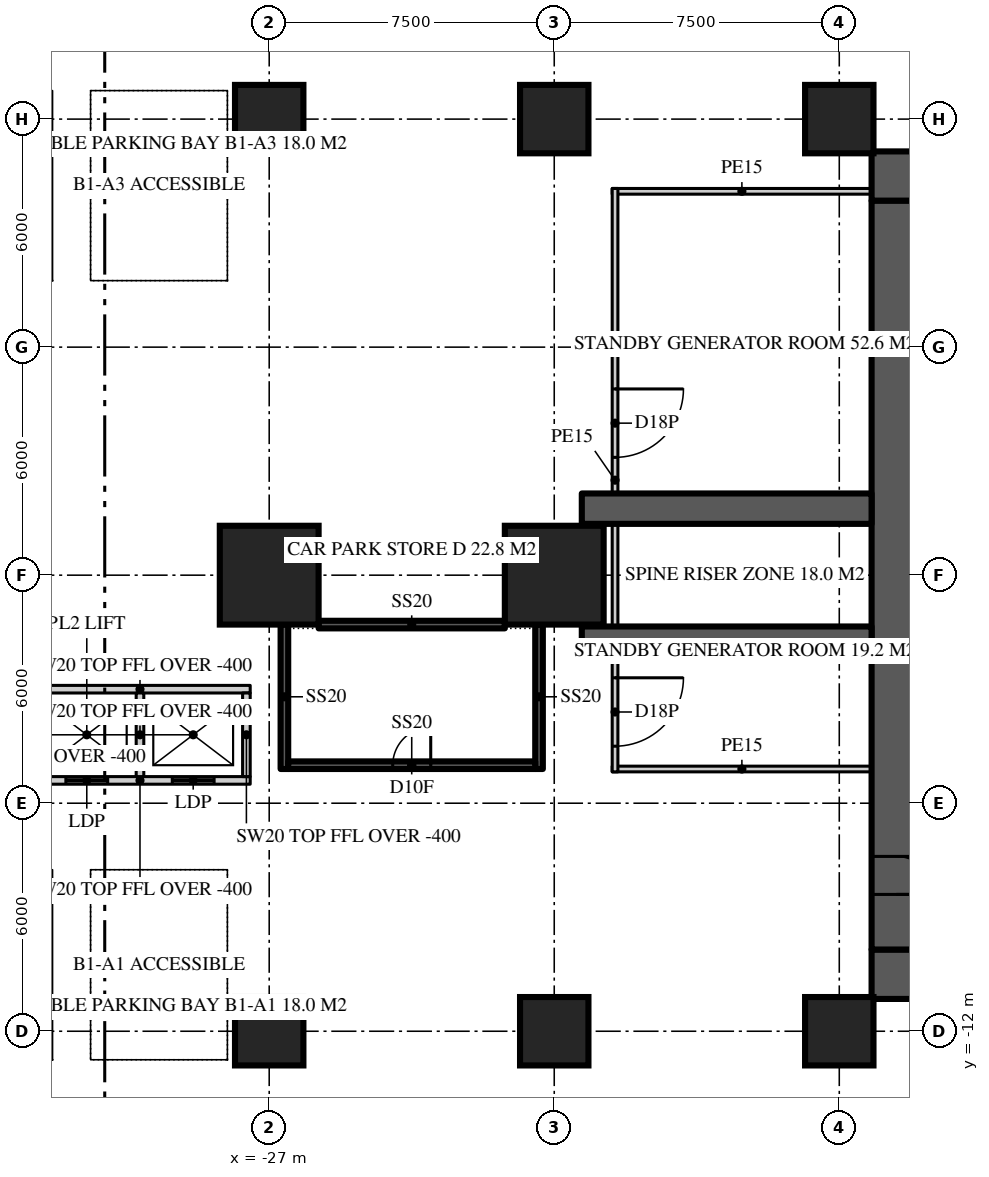
"""IFC4 building model, lengths in metres.
Left out: names, types, materials, properties, quantities, classifications, styles, units other than length and angle.
Written with IfcOpenShell. Run it as: python <this file> out.ifc"""

import sys

from ifc_helpers import new_model, si_unit, direction, frame, frame_2d, origin, origin_2d, place, context, subcontext, project, spatial, rectangle, extrude, element, fill, save


model = new_model("IFC4")
c1 = context("Model", 3, precision=1e-05, world=origin(), true_north=direction((0.0, 1.0)))
c2 = subcontext(c1, "Body", "Model", "MODEL_VIEW")
j1 = project(units=[si_unit("LENGTHUNIT", "METRE"), si_unit("PLANEANGLEUNIT", "RADIAN")], contexts=[c1])
p1 = place(None, origin())
s1 = spatial("IfcSite", under=j1, at=p1, CompositionType="ELEMENT")
p2 = place(p1, origin())
s2 = spatial("IfcBuilding", under=s1, at=p2, CompositionType="ELEMENT")
p3 = place(p2, frame((0.0, 0.0, -5.0)))
s3 = spatial("IfcBuildingStorey", under=s2, at=p3, CompositionType="ELEMENT", Elevation=-5.0)
p4 = place(p3, frame((-11.15, 10.5, 0.0), z_axis=(0.0, 0.0, 1.0), x_axis=(1.0, 0.0, 0.0)))
e1 = element("IfcWall", 1, at=p4, inside=s3, PredefinedType="SHEAR", context=c2, shape_type="SweptSolid", body=[
    extrude(rectangle(XDim=22.3, YDim=1.3, at=frame_2d((11.15, 0.0))), origin(), (0.0, 0.0, 1.0), 5.0),
])
p5 = place(p4, frame((4.25, 0.0, 0.0)))
e2 = element("IfcOpeningElement", 2, at=p5, cuts=e1, PredefinedType="OPENING", context=c2, shape_type="SweptSolid", body=[
    extrude(rectangle(XDim=1.8, YDim=2.2, at=frame_2d((0.9, 1.1))), frame((0.0, 0.66, 0.0), z_axis=(0.0, -1.0, 0.0), x_axis=(1.0, 0.0, 0.0)), (0.0, 0.0, 1.0), 1.32),
])
p6 = place(p4, frame((16.25, 0.0, 0.0)))
e3 = element("IfcOpeningElement", 3, at=p6, cuts=e1, PredefinedType="OPENING", context=c2, shape_type="SweptSolid", body=[
    extrude(rectangle(XDim=1.8, YDim=2.2, at=frame_2d((0.9, 1.1))), frame((0.0, 0.66, 0.0), z_axis=(0.0, -1.0, 0.0), x_axis=(1.0, 0.0, 0.0)), (0.0, 0.0, 1.0), 1.32),
])
p7 = place(p3, frame((11.15, -10.5, 0.0), z_axis=(0.0, 0.0, 1.0), x_axis=(-1.0, 0.0, 0.0)))
e4 = element("IfcWall", 4, at=p7, inside=s3, PredefinedType="SHEAR", context=c2, shape_type="SweptSolid", body=[
    extrude(rectangle(XDim=22.3, YDim=1.3, at=frame_2d((11.15, 0.0))), origin(), (0.0, 0.0, 1.0), 5.0),
])
p8 = place(p7, frame((16.25, 0.0, 0.0)))
e5 = element("IfcOpeningElement", 5, at=p8, cuts=e4, PredefinedType="OPENING", context=c2, shape_type="SweptSolid", body=[
    extrude(rectangle(XDim=1.8, YDim=2.2, at=frame_2d((0.9, 1.1))), frame((0.0, 0.66, 0.0), z_axis=(0.0, -1.0, 0.0), x_axis=(1.0, 0.0, 0.0)), (0.0, 0.0, 1.0), 1.32),
])
p9 = place(p7, frame((4.25, 0.0, 0.0)))
e6 = element("IfcOpeningElement", 6, at=p9, cuts=e4, PredefinedType="OPENING", context=c2, shape_type="SweptSolid", body=[
    extrude(rectangle(XDim=1.8, YDim=2.2, at=frame_2d((0.9, 1.1))), frame((0.0, 0.66, 0.0), z_axis=(0.0, -1.0, 0.0), x_axis=(1.0, 0.0, 0.0)), (0.0, 0.0, 1.0), 1.32),
])
p10 = place(p3, frame((-10.5, 9.85, 0.0), z_axis=(0.0, 0.0, 1.0), x_axis=(0.0, -1.0, 0.0)))
e7 = element("IfcWall", 7, at=p10, inside=s3, PredefinedType="SHEAR", context=c2, shape_type="SweptSolid", body=[
    extrude(rectangle(XDim=19.7, YDim=1.3, at=frame_2d((9.85, 0.0))), origin(), (0.0, 0.0, 1.0), 5.0),
])
p11 = place(p10, frame((17.25, 0.0, 0.0)))
e8 = element("IfcOpeningElement", 8, at=p11, cuts=e7, PredefinedType="OPENING", context=c2, shape_type="SweptSolid", body=[
    extrude(rectangle(XDim=1.0, YDim=2.2, at=frame_2d((0.5, 1.1))), frame((0.0, 0.66, 0.0), z_axis=(0.0, -1.0, 0.0), x_axis=(1.0, 0.0, 0.0)), (0.0, 0.0, 1.0), 1.32),
])
for number, where, z_axis, x_axis in (
    (9, (-11.15, 1.75, 0.0), (0.0, 0.0, 1.0), (-1.0, 0.0, 0.0)),
    (10, (-11.15, -1.75, 0.0), (0.0, 0.0, 1.0), (-1.0, 0.0, 0.0)),
):
    element("IfcWall", number, at=place(p3, frame(where, z_axis=z_axis, x_axis=x_axis)), inside=s3, PredefinedType="SHEAR", context=c2, shape_type="SweptSolid", body=[
        extrude(rectangle(XDim=7.625, YDim=0.8, at=frame_2d((3.812, 0.0))), origin(), (0.0, 0.0, 1.0), 5.0),
    ])
for number, where, z_axis, x_axis in (
    (11, (-27.0, -12.0, 0.0), (0.0, 0.0, 1.0), (1.0, 0.0, 0.0)),
    (12, (-19.5, -12.0, 0.0), (0.0, 0.0, 1.0), (1.0, 0.0, 0.0)),
    (13, (-12.0, -12.0, 0.0), (0.0, 0.0, 1.0), (1.0, 0.0, 0.0)),
):
    element("IfcColumn", number, at=place(p3, frame(where, z_axis=z_axis, x_axis=x_axis)), inside=s3, PredefinedType="COLUMN", context=c2, shape_type="SweptSolid", body=[
        extrude(rectangle(XDim=1.8, YDim=1.8, at=origin_2d()), origin(), (0.0, 0.0, 1.0), 5.0),
    ])
for number, where, z_axis, x_axis in (
    (14, (-27.0, 0.0, 0.0), (0.0, 0.0, 1.0), (1.0, 0.0, 0.0)),
    (15, (-19.5, 0.0, 0.0), (0.0, 0.0, 1.0), (1.0, 0.0, 0.0)),
):
    element("IfcColumn", number, at=place(p3, frame(where, z_axis=z_axis, x_axis=x_axis)), inside=s3, PredefinedType="COLUMN", context=c2, shape_type="SweptSolid", body=[
        extrude(rectangle(XDim=2.6, YDim=2.6, at=origin_2d()), origin(), (0.0, 0.0, 1.0), 5.0),
    ])
for number, where, z_axis, x_axis in (
    (16, (-27.0, 12.0, 0.0), (0.0, 0.0, 1.0), (1.0, 0.0, 0.0)),
    (17, (-19.5, 12.0, 0.0), (0.0, 0.0, 1.0), (1.0, 0.0, 0.0)),
    (18, (-12.0, 12.0, 0.0), (0.0, 0.0, 1.0), (1.0, 0.0, 0.0)),
):
    element("IfcColumn", number, at=place(p3, frame(where, z_axis=z_axis, x_axis=x_axis)), inside=s3, PredefinedType="COLUMN", context=c2, shape_type="SweptSolid", body=[
        extrude(rectangle(XDim=1.8, YDim=1.8, at=origin_2d()), origin(), (0.0, 0.0, 1.0), 5.0),
    ])
for number, where, z_axis, x_axis in (
    (19, (-11.15, 10.1, 0.0), (0.0, 0.0, 1.0), (-1.0, 0.0, 0.0)),
    (20, (-11.15, -5.1, 0.0), (0.0, 0.0, 1.0), (-1.0, 0.0, 0.0)),
):
    element("IfcWall", number, at=place(p3, frame(where, z_axis=z_axis, x_axis=x_axis)), inside=s3, PredefinedType="SOLIDWALL", context=c2, shape_type="SweptSolid", body=[
        extrude(rectangle(XDim=6.825, YDim=0.15, at=frame_2d((3.413, 0.0))), origin(), (0.0, 0.0, 1.0), 4.6),
    ])
p12 = place(p3, frame((-17.9, 10.175, 0.0), z_axis=(0.0, 0.0, 1.0), x_axis=(0.0, -1.0, 0.0)))
e21 = element("IfcWall", 21, at=p12, inside=s3, PredefinedType="SOLIDWALL", context=c2, shape_type="SweptSolid", body=[
    extrude(rectangle(XDim=15.35, YDim=0.15, at=frame_2d((7.675, 0.0))), origin(), (0.0, 0.0, 1.0), 4.6),
])
p13 = place(p12, frame((5.275, 0.0, 0.0)))
e22 = element("IfcOpeningElement", 22, at=p13, cuts=e21, PredefinedType="OPENING", context=c2, shape_type="SweptSolid", body=[
    extrude(rectangle(XDim=1.8, YDim=2.4, at=frame_2d((0.9, 1.2))), frame((0.0, 0.085, 0.0), z_axis=(0.0, -1.0, 0.0), x_axis=(1.0, 0.0, 0.0)), (0.0, 0.0, 1.0), 0.17),
])
p14 = place(p12, frame((12.875, 0.0, 0.0)))
e23 = element("IfcOpeningElement", 23, at=p14, cuts=e21, PredefinedType="OPENING", context=c2, shape_type="SweptSolid", body=[
    extrude(rectangle(XDim=1.8, YDim=2.4, at=frame_2d((0.9, 1.2))), frame((0.0, 0.085, 0.0), z_axis=(0.0, -1.0, 0.0), x_axis=(1.0, 0.0, 0.0)), (0.0, 0.0, 1.0), 0.17),
])
p15 = place(p3, frame((-27.5, -3.0, 0.0), z_axis=(0.0, 0.0, 1.0), x_axis=(-1.0, 0.0, 0.0)))
e24 = element("IfcWall", 24, at=p15, inside=s3, PredefinedType="SOLIDWALL", context=c2, shape_type="SweptSolid", body=[
    extrude(rectangle(XDim=5.8, YDim=0.2, at=frame_2d((2.9, 0.0))), origin(), (0.0, 0.0, 1.0), 4.6),
])
p16 = place(p3, frame((-33.3, -5.4, 0.0), z_axis=(0.0, 0.0, 1.0), x_axis=(1.0, 0.0, 0.0)))
e25 = element("IfcWall", 25, at=p16, inside=s3, PredefinedType="SOLIDWALL", context=c2, shape_type="SweptSolid", body=[
    extrude(rectangle(XDim=5.8, YDim=0.2, at=frame_2d((2.9, 0.0))), origin(), (0.0, 0.0, 1.0), 4.6),
])
p17 = place(p16, frame((3.75, 0.0, 0.0)))
e26 = element("IfcOpeningElement", 26, at=p17, cuts=e25, PredefinedType="OPENING", context=c2, shape_type="SweptSolid", body=[
    extrude(rectangle(XDim=1.1, YDim=2.2, at=frame_2d((0.55, 1.1))), frame((0.0, 0.11, 0.0), z_axis=(0.0, -1.0, 0.0), x_axis=(1.0, 0.0, 0.0)), (0.0, 0.0, 1.0), 0.22),
])
p18 = place(p16, frame((0.95, 0.0, 0.0)))
e27 = element("IfcOpeningElement", 27, at=p18, cuts=e25, PredefinedType="OPENING", context=c2, shape_type="SweptSolid", body=[
    extrude(rectangle(XDim=1.1, YDim=2.2, at=frame_2d((0.55, 1.1))), frame((0.0, 0.11, 0.0), z_axis=(0.0, -1.0, 0.0), x_axis=(1.0, 0.0, 0.0)), (0.0, 0.0, 1.0), 0.22),
])
for number, where, z_axis, x_axis in (
    (28, (-27.6, -3.1, 0.0), (0.0, 0.0, 1.0), (0.0, -1.0, 0.0)),
    (29, (-30.4, -3.1, 0.0), (0.0, 0.0, 1.0), (0.0, -1.0, 0.0)),
):
    element("IfcWall", number, at=place(p3, frame(where, z_axis=z_axis, x_axis=x_axis)), inside=s3, PredefinedType="SOLIDWALL", context=c2, shape_type="SweptSolid", body=[
        extrude(rectangle(XDim=2.2, YDim=0.2, at=frame_2d((1.1, 0.0))), origin(), (0.0, 0.0, 1.0), 4.6),
    ])
for number, where, z_axis, x_axis in (
    (30, (-19.9, -1.3, 0.0), (0.0, 0.0, 1.0), (0.0, -1.0, 0.0)),
    (31, (-26.6, -5.1, 0.0), (0.0, 0.0, 1.0), (0.0, 1.0, 0.0)),
):
    element("IfcWall", number, at=place(p3, frame(where, z_axis=z_axis, x_axis=x_axis)), inside=s3, PredefinedType="SOLIDWALL", context=c2, shape_type="SweptSolid", body=[
        extrude(rectangle(XDim=3.8, YDim=0.2, at=frame_2d((1.9, 0.0))), origin(), (0.0, 0.0, 1.0), 4.7),
    ])
p19 = place(p3, frame((-20.8, -1.3, 0.0), z_axis=(0.0, 0.0, 1.0), x_axis=(-1.0, 0.0, 0.0)))
e32 = element("IfcWall", 32, at=p19, inside=s3, PredefinedType="SOLIDWALL", context=c2, shape_type="SweptSolid", body=[
    extrude(rectangle(XDim=4.9, YDim=0.2, at=frame_2d((2.45, 0.0))), origin(), (0.0, 0.0, 1.0), 4.7),
])
p20 = place(p3, frame((-26.5, -5.0, 0.0), z_axis=(0.0, 0.0, 1.0), x_axis=(1.0, 0.0, 0.0)))
e33 = element("IfcWall", 33, at=p20, inside=s3, PredefinedType="SOLIDWALL", context=c2, shape_type="SweptSolid", body=[
    extrude(rectangle(XDim=6.5, YDim=0.2, at=frame_2d((3.25, 0.0))), origin(), (0.0, 0.0, 1.0), 4.7),
])
p21 = place(p20, frame((2.75, 0.0, 0.0)))
e34 = element("IfcOpeningElement", 34, at=p21, cuts=e33, PredefinedType="OPENING", context=c2, shape_type="SweptSolid", body=[
    extrude(rectangle(XDim=1.0, YDim=2.2, at=frame_2d((0.5, 1.1))), frame((0.0, 0.11, 0.0), z_axis=(0.0, -1.0, 0.0), x_axis=(1.0, 0.0, 0.0)), (0.0, 0.0, 1.0), 0.22),
])
p22 = place(p17, origin())
e35 = element("IfcDoor", 35, at=p22, inside=s3, OperationType="SLIDING_TO_LEFT", PredefinedType="DOOR", context=c2, shape_type="SweptSolid", body=[
    extrude(rectangle(XDim=1.1, YDim=2.2, at=frame_2d((0.55, 1.1))), frame((0.0, 0.025, 0.0), z_axis=(0.0, -1.0, 0.0), x_axis=(1.0, 0.0, 0.0)), (0.0, 0.0, 1.0), 0.05),
])
fill(e26, e35)
p23 = place(p18, origin())
e36 = element("IfcDoor", 36, at=p23, inside=s3, OperationType="SLIDING_TO_LEFT", PredefinedType="DOOR", context=c2, shape_type="SweptSolid", body=[
    extrude(rectangle(XDim=1.1, YDim=2.2, at=frame_2d((0.55, 1.1))), frame((0.0, 0.025, 0.0), z_axis=(0.0, -1.0, 0.0), x_axis=(1.0, 0.0, 0.0)), (0.0, 0.0, 1.0), 0.05),
])
fill(e27, e36)
p24 = place(p11, origin())
e37 = element("IfcDoor", 37, at=p24, inside=s3, OperationType="SINGLE_SWING_RIGHT", PredefinedType="DOOR", context=c2, shape_type="SweptSolid", body=[
    extrude(rectangle(XDim=1.0, YDim=2.2, at=frame_2d((0.5, 1.1))), frame((0.0, 0.025, 0.0), z_axis=(0.0, -1.0, 0.0), x_axis=(1.0, 0.0, 0.0)), (0.0, 0.0, 1.0), 0.05),
])
fill(e8, e37)
p25 = place(p13, origin())
e38 = element("IfcDoor", 38, at=p25, inside=s3, OperationType="DOUBLE_DOOR_DOUBLE_SWING", PredefinedType="DOOR", context=c2, shape_type="SweptSolid", body=[
    extrude(rectangle(XDim=1.8, YDim=2.4, at=frame_2d((0.9, 1.2))), frame((0.0, 0.025, 0.0), z_axis=(0.0, -1.0, 0.0), x_axis=(1.0, 0.0, 0.0)), (0.0, 0.0, 1.0), 0.05),
])
fill(e22, e38)
p26 = place(p14, origin())
e39 = element("IfcDoor", 39, at=p26, inside=s3, OperationType="DOUBLE_DOOR_DOUBLE_SWING", PredefinedType="DOOR", context=c2, shape_type="SweptSolid", body=[
    extrude(rectangle(XDim=1.8, YDim=2.4, at=frame_2d((0.9, 1.2))), frame((0.0, 0.025, 0.0), z_axis=(0.0, -1.0, 0.0), x_axis=(1.0, 0.0, 0.0)), (0.0, 0.0, 1.0), 0.05),
])
fill(e23, e39)
p27 = place(p21, origin())
e40 = element("IfcDoor", 40, at=p27, inside=s3, OperationType="SINGLE_SWING_RIGHT", PredefinedType="DOOR", context=c2, shape_type="SweptSolid", body=[
    extrude(rectangle(XDim=1.0, YDim=2.2, at=frame_2d((0.5, 1.1))), frame((0.0, 0.025, 0.0), z_axis=(0.0, -1.0, 0.0), x_axis=(1.0, 0.0, 0.0)), (0.0, 0.0, 1.0), 0.05),
])
fill(e34, e40)
save(model, sys.argv[1])
